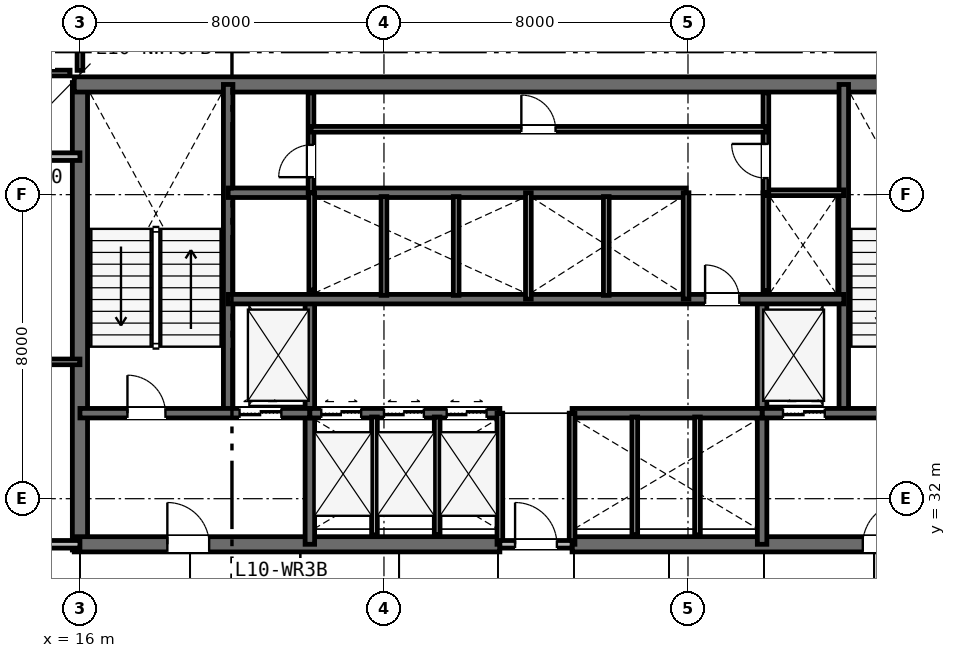
"""IFC4 building model, lengths in metres.
Left out: names, types, materials, properties, quantities, classifications, styles, units other than length and angle.
Written with IfcOpenShell. Run it as: python <this file> out.ifc"""

import sys

from ifc_helpers import new_model, si_unit, direction, frame, frame_2d, origin, place, context, subcontext, project, spatial, rectangle, extrude, element, fill, save


model = new_model("IFC4")
c1 = context("Model", 3, precision=1e-05, world=origin(), true_north=direction((0.0, 1.0)))
c2 = subcontext(c1, "Body", "Model", "MODEL_VIEW")
j1 = project(units=[si_unit("LENGTHUNIT", "METRE"), si_unit("PLANEANGLEUNIT", "RADIAN")], contexts=[c1])
p1 = place(None, origin())
s1 = spatial("IfcSite", under=j1, at=p1, CompositionType="ELEMENT")
p2 = place(p1, origin())
s2 = spatial("IfcBuilding", under=s1, at=p2, CompositionType="ELEMENT")
p3 = place(p2, frame((0.0, 0.0, 43.8)))
s3 = spatial("IfcBuildingStorey", under=s2, at=p3, CompositionType="ELEMENT", Elevation=43.8)
p4 = place(p3, frame((16.0, 30.65, 0.0), z_axis=(0.0, 0.0, 1.0), x_axis=(0.0, 1.0, 0.0)))
e1 = element("IfcWall", 1, at=p4, inside=s3, PredefinedType="SHEAR", context=c2, shape_type="SweptSolid", body=[
    extrude(rectangle(XDim=12.3, YDim=0.4, at=frame_2d((6.15, 0.0))), origin(), (0.0, 0.0, 1.0), 3.6),
])
p5 = place(p3, frame((15.85, 42.9, 0.0), z_axis=(0.0, 0.0, 1.0), x_axis=(1.0, 0.0, 0.0)))
e2 = element("IfcWall", 2, at=p5, inside=s3, PredefinedType="SHEAR", context=c2, shape_type="SweptSolid", body=[
    extrude(rectangle(XDim=24.3, YDim=0.4, at=frame_2d((12.15, 0.0))), origin(), (0.0, 0.0, 1.0), 3.6),
])
p6 = place(p3, frame((15.85, 30.8, 0.0), z_axis=(0.0, 0.0, 1.0), x_axis=(1.0, 0.0, 0.0)))
e3 = element("IfcWall", 3, at=p6, inside=s3, PredefinedType="SHEAR", context=c2, shape_type="SweptSolid", body=[
    extrude(rectangle(XDim=11.2, YDim=0.4, at=frame_2d((5.6, 0.0))), origin(), (0.0, 0.0, 1.0), 3.6),
])
p7 = place(p6, frame((2.45, 0.0, 0.0)))
e4 = element("IfcOpeningElement", 4, at=p7, cuts=e3, PredefinedType="OPENING", context=c2, shape_type="SweptSolid", body=[
    extrude(rectangle(XDim=1.1, YDim=2.15, at=frame_2d((0.55, 1.075))), frame((0.0, 0.21, 0.0), z_axis=(0.0, -1.0, 0.0), x_axis=(1.0, 0.0, 0.0)), (0.0, 0.0, 1.0), 0.42),
])
p8 = place(p3, frame((28.95, 30.8, 0.0), z_axis=(0.0, 0.0, 1.0), x_axis=(1.0, 0.0, 0.0)))
e5 = element("IfcWall", 5, at=p8, inside=s3, PredefinedType="SHEAR", context=c2, shape_type="SweptSolid", body=[
    extrude(rectangle(XDim=11.2, YDim=0.4, at=frame_2d((5.6, 0.0))), origin(), (0.0, 0.0, 1.0), 3.6),
])
p9 = place(p8, frame((7.65, 0.0, 0.0)))
e6 = element("IfcOpeningElement", 6, at=p9, cuts=e5, PredefinedType="OPENING", context=c2, shape_type="SweptSolid", body=[
    extrude(rectangle(XDim=1.1, YDim=2.15, at=frame_2d((0.55, 1.075))), frame((0.0, 0.21, 0.0), z_axis=(0.0, -1.0, 0.0), x_axis=(1.0, 0.0, 0.0)), (0.0, 0.0, 1.0), 0.42),
])
for number, where, z_axis, x_axis in (
    (7, (19.9, 34.25, 0.0), (0.0, 0.0, 1.0), (0.0, 1.0, 0.0)),
    (8, (36.1, 34.25, 0.0), (0.0, 0.0, 1.0), (0.0, 1.0, 0.0)),
):
    element("IfcWall", number, at=place(p3, frame(where, z_axis=z_axis, x_axis=x_axis)), inside=s3, PredefinedType="SHEAR", context=c2, shape_type="SweptSolid", body=[
        extrude(rectangle(XDim=8.65, YDim=0.25, at=frame_2d((4.325, 0.0))), origin(), (0.0, 0.0, 1.0), 3.6),
    ])
for number, where, z_axis, x_axis in (
    (9, (22.05, 30.8, 0.0), (0.0, 0.0, 1.0), (0.0, 1.0, 0.0)),
    (10, (33.95, 30.8, 0.0), (0.0, 0.0, 1.0), (0.0, 1.0, 0.0)),
):
    element("IfcWall", number, at=place(p3, frame(where, z_axis=z_axis, x_axis=x_axis)), inside=s3, PredefinedType="SHEAR", context=c2, shape_type="SweptSolid", body=[
        extrude(rectangle(XDim=6.45, YDim=0.25, at=frame_2d((3.225, 0.0))), origin(), (0.0, 0.0, 1.0), 3.6),
    ])
p10 = place(p3, frame((16.0, 34.25, 0.0), z_axis=(0.0, 0.0, 1.0), x_axis=(1.0, 0.0, 0.0)))
e11 = element("IfcWall", 11, at=p10, inside=s3, PredefinedType="SHEAR", context=c2, shape_type="SweptSolid", body=[
    extrude(rectangle(XDim=6.05, YDim=0.25, at=frame_2d((3.025, 0.0))), origin(), (0.0, 0.0, 1.0), 3.6),
])
p11 = place(p10, frame((1.25, 0.0, 0.0)))
e12 = element("IfcOpeningElement", 12, at=p11, cuts=e11, PredefinedType="OPENING", context=c2, shape_type="SweptSolid", body=[
    extrude(rectangle(XDim=1.0, YDim=2.15, at=frame_2d((0.5, 1.075))), frame((0.0, 0.135, 0.0), z_axis=(0.0, -1.0, 0.0), x_axis=(1.0, 0.0, 0.0)), (0.0, 0.0, 1.0), 0.27),
])
p12 = place(p10, frame((4.2, 0.0, 0.0)))
e13 = element("IfcOpeningElement", 13, at=p12, cuts=e11, PredefinedType="OPENING", context=c2, shape_type="SweptSolid", body=[
    extrude(rectangle(XDim=1.1, YDim=2.15, at=frame_2d((0.55, 1.075))), frame((0.0, 0.135, 0.0), z_axis=(0.0, -1.0, 0.0), x_axis=(1.0, 0.0, 0.0)), (0.0, 0.0, 1.0), 0.27),
])
p13 = place(p3, frame((33.95, 34.25, 0.0), z_axis=(0.0, 0.0, 1.0), x_axis=(1.0, 0.0, 0.0)))
e14 = element("IfcWall", 14, at=p13, inside=s3, PredefinedType="SHEAR", context=c2, shape_type="SweptSolid", body=[
    extrude(rectangle(XDim=6.05, YDim=0.25, at=frame_2d((3.025, 0.0))), origin(), (0.0, 0.0, 1.0), 3.6),
])
p14 = place(p13, frame((3.7, 0.0, 0.0)))
e15 = element("IfcOpeningElement", 15, at=p14, cuts=e14, PredefinedType="OPENING", context=c2, shape_type="SweptSolid", body=[
    extrude(rectangle(XDim=1.0, YDim=2.15, at=frame_2d((0.5, 1.075))), frame((0.0, 0.135, 0.0), z_axis=(0.0, -1.0, 0.0), x_axis=(1.0, 0.0, 0.0)), (0.0, 0.0, 1.0), 0.27),
])
p15 = place(p13, frame((0.55, 0.0, 0.0)))
e16 = element("IfcOpeningElement", 16, at=p15, cuts=e14, PredefinedType="OPENING", context=c2, shape_type="SweptSolid", body=[
    extrude(rectangle(XDim=1.1, YDim=2.15, at=frame_2d((0.55, 1.075))), frame((0.0, 0.135, 0.0), z_axis=(0.0, -1.0, 0.0), x_axis=(1.0, 0.0, 0.0)), (0.0, 0.0, 1.0), 0.27),
])
p16 = place(p3, frame((22.05, 34.25, 0.0), z_axis=(0.0, 0.0, 1.0), x_axis=(1.0, 0.0, 0.0)))
e17 = element("IfcWall", 17, at=p16, inside=s3, PredefinedType="SHEAR", context=c2, shape_type="SweptSolid", body=[
    extrude(rectangle(XDim=5.0, YDim=0.25, at=frame_2d((2.5, 0.0))), origin(), (0.0, 0.0, 1.0), 3.6),
])
p17 = place(p16, frame((0.3, 0.0, 0.0)))
e18 = element("IfcOpeningElement", 18, at=p17, cuts=e17, PredefinedType="OPENING", context=c2, shape_type="SweptSolid", body=[
    extrude(rectangle(XDim=1.05, YDim=2.15, at=frame_2d((0.525, 1.075))), frame((0.0, 0.135, 0.0), z_axis=(0.0, -1.0, 0.0), x_axis=(1.0, 0.0, 0.0)), (0.0, 0.0, 1.0), 0.27),
])
p18 = place(p16, frame((1.95, 0.0, 0.0)))
e19 = element("IfcOpeningElement", 19, at=p18, cuts=e17, PredefinedType="OPENING", context=c2, shape_type="SweptSolid", body=[
    extrude(rectangle(XDim=1.05, YDim=2.15, at=frame_2d((0.525, 1.075))), frame((0.0, 0.135, 0.0), z_axis=(0.0, -1.0, 0.0), x_axis=(1.0, 0.0, 0.0)), (0.0, 0.0, 1.0), 0.27),
])
p19 = place(p16, frame((3.6, 0.0, 0.0)))
e20 = element("IfcOpeningElement", 20, at=p19, cuts=e17, PredefinedType="OPENING", context=c2, shape_type="SweptSolid", body=[
    extrude(rectangle(XDim=1.05, YDim=2.15, at=frame_2d((0.525, 1.075))), frame((0.0, 0.135, 0.0), z_axis=(0.0, -1.0, 0.0), x_axis=(1.0, 0.0, 0.0)), (0.0, 0.0, 1.0), 0.27),
])
p20 = place(p3, frame((28.95, 34.25, 0.0), z_axis=(0.0, 0.0, 1.0), x_axis=(1.0, 0.0, 0.0)))
e21 = element("IfcWall", 21, at=p20, inside=s3, PredefinedType="SHEAR", context=c2, shape_type="SweptSolid", body=[
    extrude(rectangle(XDim=5.0, YDim=0.25, at=frame_2d((2.5, 0.0))), origin(), (0.0, 0.0, 1.0), 3.6),
])
p21 = place(p3, frame((19.9, 37.25, 0.0), z_axis=(0.0, 0.0, 1.0), x_axis=(1.0, 0.0, 0.0)))
e22 = element("IfcWall", 22, at=p21, inside=s3, PredefinedType="SHEAR", context=c2, shape_type="SweptSolid", body=[
    extrude(rectangle(XDim=16.2, YDim=0.25, at=frame_2d((8.1, 0.0))), origin(), (0.0, 0.0, 1.0), 3.6),
])
p22 = place(p21, frame((12.55, 0.0, 0.0)))
e23 = element("IfcOpeningElement", 23, at=p22, cuts=e22, PredefinedType="OPENING", context=c2, shape_type="SweptSolid", body=[
    extrude(rectangle(XDim=0.9, YDim=2.15, at=frame_2d((0.45, 1.075))), frame((0.0, 0.135, 0.0), z_axis=(0.0, -1.0, 0.0), x_axis=(1.0, 0.0, 0.0)), (0.0, 0.0, 1.0), 0.27),
])
p23 = place(p3, frame((19.9, 40.05, 0.0), z_axis=(0.0, 0.0, 1.0), x_axis=(1.0, 0.0, 0.0)))
e24 = element("IfcWall", 24, at=p23, inside=s3, PredefinedType="SHEAR", context=c2, shape_type="SweptSolid", body=[
    extrude(rectangle(XDim=12.05, YDim=0.25, at=frame_2d((6.025, 0.0))), origin(), (0.0, 0.0, 1.0), 3.6),
])
for number, where, z_axis, x_axis in (
    (25, (27.05, 30.8, 0.0), (0.0, 0.0, 1.0), (0.0, 1.0, 0.0)),
    (26, (28.95, 30.8, 0.0), (0.0, 0.0, 1.0), (0.0, 1.0, 0.0)),
):
    element("IfcWall", number, at=place(p3, frame(where, z_axis=z_axis, x_axis=x_axis)), inside=s3, PredefinedType="PLUMBINGWALL", context=c2, shape_type="SweptSolid", body=[
        extrude(rectangle(XDim=3.45, YDim=0.15, at=frame_2d((1.725, 0.0))), origin(), (0.0, 0.0, 1.0), 3.33),
    ])
p24 = place(p3, frame((27.05, 30.8, 0.0), z_axis=(0.0, 0.0, 1.0), x_axis=(1.0, 0.0, 0.0)))
e27 = element("IfcWall", 27, at=p24, inside=s3, PredefinedType="PARTITIONING", context=c2, shape_type="SweptSolid", body=[
    extrude(rectangle(XDim=1.9, YDim=0.2, at=frame_2d((0.95, 0.0))), origin(), (0.0, 0.0, 1.0), 3.33),
])
p25 = place(p24, frame((0.4, 0.0, 0.0)))
e28 = element("IfcOpeningElement", 28, at=p25, cuts=e27, PredefinedType="OPENING", context=c2, shape_type="SweptSolid", body=[
    extrude(rectangle(XDim=1.1, YDim=2.15, at=frame_2d((0.55, 1.075))), frame((0.0, 0.11, 0.0), z_axis=(0.0, -1.0, 0.0), x_axis=(1.0, 0.0, 0.0)), (0.0, 0.0, 1.0), 0.22),
])
for number, where, z_axis, x_axis in (
    (29, (23.75, 31.05, 0.0), (0.0, 0.0, 1.0), (0.0, 1.0, 0.0)),
    (30, (25.4, 31.05, 0.0), (0.0, 0.0, 1.0), (0.0, 1.0, 0.0)),
    (31, (30.6, 31.05, 0.0), (0.0, 0.0, 1.0), (0.0, 1.0, 0.0)),
    (32, (32.25, 31.05, 0.0), (0.0, 0.0, 1.0), (0.0, 1.0, 0.0)),
):
    element("IfcWall", number, at=place(p3, frame(where, z_axis=z_axis, x_axis=x_axis)), inside=s3, PredefinedType="PLUMBINGWALL", context=c2, shape_type="SweptSolid", body=[
        extrude(rectangle(XDim=3.1, YDim=0.15, at=frame_2d((1.55, 0.0))), origin(), (0.0, 0.0, 1.0), 3.33),
    ])
p26 = place(p3, frame((22.1, 37.49, 0.0), z_axis=(0.0, 0.0, 1.0), x_axis=(0.0, 1.0, 0.0)))
e33 = element("IfcWall", 33, at=p26, inside=s3, PredefinedType="PLUMBINGWALL", context=c2, shape_type="SweptSolid", body=[
    extrude(rectangle(XDim=2.56, YDim=0.15, at=frame_2d((1.28, 0.0))), origin(), (0.0, 0.0, 1.0), 3.33),
])
p27 = place(p3, frame((27.8, 37.25, 0.0), z_axis=(0.0, 0.0, 1.0), x_axis=(0.0, 1.0, 0.0)))
e34 = element("IfcWall", 34, at=p27, inside=s3, PredefinedType="PLUMBINGWALL", context=c2, shape_type="SweptSolid", body=[
    extrude(rectangle(XDim=2.8, YDim=0.15, at=frame_2d((1.4, 0.0))), origin(), (0.0, 0.0, 1.0), 3.33),
])
for number, where, z_axis, x_axis in (
    (35, (24.0, 37.35, 0.0), (0.0, 0.0, 1.0), (0.0, 1.0, 0.0)),
    (36, (25.9, 37.35, 0.0), (0.0, 0.0, 1.0), (0.0, 1.0, 0.0)),
):
    element("IfcWall", number, at=place(p3, frame(where, z_axis=z_axis, x_axis=x_axis)), inside=s3, PredefinedType="PLUMBINGWALL", context=c2, shape_type="SweptSolid", body=[
        extrude(rectangle(XDim=2.6, YDim=0.15, at=frame_2d((1.3, 0.0))), origin(), (0.0, 0.0, 1.0), 3.33),
    ])
p28 = place(p3, frame((31.95, 37.25, 0.0), z_axis=(0.0, 0.0, 1.0), x_axis=(0.0, 1.0, 0.0)))
e37 = element("IfcWall", 37, at=p28, inside=s3, PredefinedType="PLUMBINGWALL", context=c2, shape_type="SweptSolid", body=[
    extrude(rectangle(XDim=2.8, YDim=0.15, at=frame_2d((1.4, 0.0))), origin(), (0.0, 0.0, 1.0), 3.33),
])
p29 = place(p3, frame((29.85, 37.35, 0.0), z_axis=(0.0, 0.0, 1.0), x_axis=(0.0, 1.0, 0.0)))
e38 = element("IfcWall", 38, at=p29, inside=s3, PredefinedType="PLUMBINGWALL", context=c2, shape_type="SweptSolid", body=[
    extrude(rectangle(XDim=2.6, YDim=0.15, at=frame_2d((1.3, 0.0))), origin(), (0.0, 0.0, 1.0), 3.33),
])
p30 = place(p3, frame((34.05, 37.473, 0.0), z_axis=(0.0, 0.0, 1.0), x_axis=(0.0, 1.0, 0.0)))
e39 = element("IfcWall", 39, at=p30, inside=s3, PredefinedType="PLUMBINGWALL", context=c2, shape_type="SweptSolid", body=[
    extrude(rectangle(XDim=2.577, YDim=0.15, at=frame_2d((1.288, 0.0))), origin(), (0.0, 0.0, 1.0), 3.33),
])
p31 = place(p3, frame((34.05, 40.05, 0.0), z_axis=(0.0, 0.0, 1.0), x_axis=(1.0, 0.0, 0.0)))
e40 = element("IfcWall", 40, at=p31, inside=s3, PredefinedType="PARTITIONING", context=c2, shape_type="SweptSolid", body=[
    extrude(rectangle(XDim=2.05, YDim=0.15, at=frame_2d((1.025, 0.0))), origin(), (0.0, 0.0, 1.0), 3.33),
])
p32 = place(p3, frame((34.05, 40.05, 0.0), z_axis=(0.0, 0.0, 1.0), x_axis=(0.0, 1.0, 0.0)))
e41 = element("IfcWall", 41, at=p32, inside=s3, PredefinedType="PARTITIONING", context=c2, shape_type="SweptSolid", body=[
    extrude(rectangle(XDim=2.63, YDim=0.15, at=frame_2d((1.315, 0.0))), origin(), (0.0, 0.0, 1.0), 3.33),
])
p33 = place(p32, frame((0.385, 0.0, 0.0)))
e42 = element("IfcOpeningElement", 42, at=p33, cuts=e41, PredefinedType="OPENING", context=c2, shape_type="SweptSolid", body=[
    extrude(rectangle(XDim=0.9, YDim=2.15, at=frame_2d((0.45, 1.075))), frame((0.0, 0.085, 0.0), z_axis=(0.0, -1.0, 0.0), x_axis=(1.0, 0.0, 0.0)), (0.0, 0.0, 1.0), 0.17),
])
p34 = place(p3, frame((22.08, 40.05, 0.0), z_axis=(0.0, 0.0, 1.0), x_axis=(0.0, 1.0, 0.0)))
e43 = element("IfcWall", 43, at=p34, inside=s3, PredefinedType="PARTITIONING", context=c2, shape_type="SweptSolid", body=[
    extrude(rectangle(XDim=2.63, YDim=0.15, at=frame_2d((1.315, 0.0))), origin(), (0.0, 0.0, 1.0), 3.33),
])
p35 = place(p34, frame((0.41, 0.0, 0.0)))
e44 = element("IfcOpeningElement", 44, at=p35, cuts=e43, PredefinedType="OPENING", context=c2, shape_type="SweptSolid", body=[
    extrude(rectangle(XDim=0.85, YDim=2.15, at=frame_2d((0.425, 1.075))), frame((0.0, 0.085, 0.0), z_axis=(0.0, -1.0, 0.0), x_axis=(1.0, 0.0, 0.0)), (0.0, 0.0, 1.0), 0.17),
])
p36 = place(p3, frame((22.08, 41.72, 0.0), z_axis=(0.0, 0.0, 1.0), x_axis=(1.0, 0.0, 0.0)))
e45 = element("IfcWall", 45, at=p36, inside=s3, PredefinedType="PARTITIONING", context=c2, shape_type="SweptSolid", body=[
    extrude(rectangle(XDim=11.97, YDim=0.15, at=frame_2d((5.985, 0.0))), origin(), (0.0, 0.0, 1.0), 3.33),
])
p37 = place(p36, frame((5.535, 0.0, 0.0)))
e46 = element("IfcOpeningElement", 46, at=p37, cuts=e45, PredefinedType="OPENING", context=c2, shape_type="SweptSolid", body=[
    extrude(rectangle(XDim=0.9, YDim=2.15, at=frame_2d((0.45, 1.075))), frame((0.0, 0.085, 0.0), z_axis=(0.0, -1.0, 0.0), x_axis=(1.0, 0.0, 0.0)), (0.0, 0.0, 1.0), 0.17),
])
p38 = place(p3, frame((8.3, 35.6, 0.0), z_axis=(0.0, 0.0, 1.0), x_axis=(1.0, 0.0, 0.0)))
e47 = element("IfcWall", 47, at=p38, inside=s3, PredefinedType="PARTITIONING", context=c2, shape_type="SweptSolid", body=[
    extrude(rectangle(XDim=7.7, YDim=0.15, at=frame_2d((3.85, 0.0))), origin(), (0.0, 0.0, 1.0), 2.82),
])
p39 = place(p3, frame((8.3, 30.8, 0.0), z_axis=(0.0, 0.0, 1.0), x_axis=(1.0, 0.0, 0.0)))
e48 = element("IfcWall", 48, at=p39, inside=s3, PredefinedType="PARTITIONING", context=c2, shape_type="SweptSolid", body=[
    extrude(rectangle(XDim=7.7, YDim=0.2, at=frame_2d((3.85, 0.0))), origin(), (0.0, 0.0, 1.0), 2.82),
])
p40 = place(p39, frame((5.325, 0.0, 0.0)))
e49 = element("IfcOpeningElement", 49, at=p40, cuts=e48, PredefinedType="OPENING", context=c2, shape_type="SweptSolid", body=[
    extrude(rectangle(XDim=0.95, YDim=2.15, at=frame_2d((0.475, 1.075))), frame((0.0, 0.11, 0.0), z_axis=(0.0, -1.0, 0.0), x_axis=(1.0, 0.0, 0.0)), (0.0, 0.0, 1.0), 0.22),
])
p41 = place(p3, frame((0.1, 41.0, 0.0), z_axis=(0.0, 0.0, 1.0), x_axis=(1.0, 0.0, 0.0)))
e50 = element("IfcWall", 50, at=p41, inside=s3, PredefinedType="PARTITIONING", context=c2, shape_type="SweptSolid", body=[
    extrude(rectangle(XDim=15.9, YDim=0.2, at=frame_2d((7.95, 0.0))), origin(), (0.0, 0.0, 1.0), 2.82),
])
p42 = place(p41, frame((6.779, 0.0, 0.0)))
e51 = element("IfcOpeningElement", 51, at=p42, cuts=e50, PredefinedType="OPENING", context=c2, shape_type="SweptSolid", body=[
    extrude(rectangle(XDim=0.95, YDim=2.15, at=frame_2d((0.475, 1.075))), frame((0.0, 0.11, 0.0), z_axis=(0.0, -1.0, 0.0), x_axis=(1.0, 0.0, 0.0)), (0.0, 0.0, 1.0), 0.22),
])
p43 = place(p3, frame((13.55, 43.2, 0.0), z_axis=(0.0, 0.0, 1.0), x_axis=(1.0, 0.0, 0.0)))
e52 = element("IfcWall", 52, at=p43, inside=s3, PredefinedType="PARTITIONING", context=c2, shape_type="SweptSolid", body=[
    extrude(rectangle(XDim=2.19, YDim=0.15, at=frame_2d((1.095, 0.0))), origin(), (0.0, 0.0, 1.0), 3.33),
])
p44 = place(p3, frame((16.0, 43.27, 0.0), z_axis=(0.0, 0.0, 1.0), x_axis=(0.0, 1.0, 0.0)))
e53 = element("IfcWall", 53, at=p44, inside=s3, PredefinedType="PARTITIONING", context=c2, shape_type="SweptSolid", body=[
    extrude(rectangle(XDim=4.63, YDim=0.15, at=frame_2d((2.315, 0.0))), origin(), (0.0, 0.0, 1.0), 2.93),
])
p45 = place(p25, origin())
e54 = element("IfcDoor", 54, at=p45, inside=s3, OperationType="SINGLE_SWING_LEFT", PredefinedType="DOOR", context=c2, shape_type="SweptSolid", body=[
    extrude(rectangle(XDim=1.1, YDim=2.15, at=frame_2d((0.55, 1.075))), frame((0.0, 0.025, 0.0), z_axis=(0.0, -1.0, 0.0), x_axis=(1.0, 0.0, 0.0)), (0.0, 0.0, 1.0), 0.05),
])
fill(e28, e54)
p46 = place(p11, origin())
e55 = element("IfcDoor", 55, at=p46, inside=s3, OperationType="SINGLE_SWING_LEFT", PredefinedType="DOOR", context=c2, shape_type="SweptSolid", body=[
    extrude(rectangle(XDim=1.0, YDim=2.15, at=frame_2d((0.5, 1.075))), frame((0.0, 0.025, 0.0), z_axis=(0.0, -1.0, 0.0), x_axis=(1.0, 0.0, 0.0)), (0.0, 0.0, 1.0), 0.05),
])
fill(e12, e55)
p47 = place(p7, origin())
e56 = element("IfcDoor", 56, at=p47, inside=s3, OperationType="SINGLE_SWING_LEFT", PredefinedType="DOOR", context=c2, shape_type="SweptSolid", body=[
    extrude(rectangle(XDim=1.1, YDim=2.15, at=frame_2d((0.55, 1.075))), frame((0.0, 0.025, 0.0), z_axis=(0.0, -1.0, 0.0), x_axis=(1.0, 0.0, 0.0)), (0.0, 0.0, 1.0), 0.05),
])
fill(e4, e56)
p48 = place(p9, origin())
e57 = element("IfcDoor", 57, at=p48, inside=s3, OperationType="SINGLE_SWING_RIGHT", PredefinedType="DOOR", context=c2, shape_type="SweptSolid", body=[
    extrude(rectangle(XDim=1.1, YDim=2.15, at=frame_2d((0.55, 1.075))), frame((0.0, 0.025, 0.0), z_axis=(0.0, -1.0, 0.0), x_axis=(1.0, 0.0, 0.0)), (0.0, 0.0, 1.0), 0.05),
])
fill(e6, e57)
p49 = place(p22, origin())
e58 = element("IfcDoor", 58, at=p49, inside=s3, OperationType="SINGLE_SWING_LEFT", PredefinedType="DOOR", context=c2, shape_type="SweptSolid", body=[
    extrude(rectangle(XDim=0.9, YDim=2.15, at=frame_2d((0.45, 1.075))), frame((0.0, 0.025, 0.0), z_axis=(0.0, -1.0, 0.0), x_axis=(1.0, 0.0, 0.0)), (0.0, 0.0, 1.0), 0.05),
])
fill(e23, e58)
p50 = place(p33, origin())
e59 = element("IfcDoor", 59, at=p50, inside=s3, OperationType="SINGLE_SWING_RIGHT", PredefinedType="DOOR", context=c2, shape_type="SweptSolid", body=[
    extrude(rectangle(XDim=0.9, YDim=2.15, at=frame_2d((0.45, 1.075))), frame((0.0, 0.025, 0.0), z_axis=(0.0, -1.0, 0.0), x_axis=(1.0, 0.0, 0.0)), (0.0, 0.0, 1.0), 0.05),
])
fill(e42, e59)
p51 = place(p35, origin())
e60 = element("IfcDoor", 60, at=p51, inside=s3, OperationType="SINGLE_SWING_LEFT", PredefinedType="DOOR", context=c2, shape_type="SweptSolid", body=[
    extrude(rectangle(XDim=0.85, YDim=2.15, at=frame_2d((0.425, 1.075))), frame((0.0, 0.025, 0.0), z_axis=(0.0, -1.0, 0.0), x_axis=(1.0, 0.0, 0.0)), (0.0, 0.0, 1.0), 0.05),
])
fill(e44, e60)
p52 = place(p37, origin())
e61 = element("IfcDoor", 61, at=p52, inside=s3, OperationType="SINGLE_SWING_LEFT", PredefinedType="DOOR", context=c2, shape_type="SweptSolid", body=[
    extrude(rectangle(XDim=0.9, YDim=2.15, at=frame_2d((0.45, 1.075))), frame((0.0, 0.025, 0.0), z_axis=(0.0, -1.0, 0.0), x_axis=(1.0, 0.0, 0.0)), (0.0, 0.0, 1.0), 0.05),
])
fill(e46, e61)
p53 = place(p12, origin())
e62 = element("IfcDoor", 62, at=p53, inside=s3, OperationType="DOUBLE_DOOR_SLIDING", PredefinedType="DOOR", context=c2, shape_type="SweptSolid", body=[
    extrude(rectangle(XDim=1.1, YDim=2.15, at=frame_2d((0.55, 1.075))), frame((0.0, 0.025, 0.0), z_axis=(0.0, -1.0, 0.0), x_axis=(1.0, 0.0, 0.0)), (0.0, 0.0, 1.0), 0.05),
])
fill(e13, e62)
p54 = place(p15, origin())
e63 = element("IfcDoor", 63, at=p54, inside=s3, OperationType="DOUBLE_DOOR_SLIDING", PredefinedType="DOOR", context=c2, shape_type="SweptSolid", body=[
    extrude(rectangle(XDim=1.1, YDim=2.15, at=frame_2d((0.55, 1.075))), frame((0.0, 0.025, 0.0), z_axis=(0.0, -1.0, 0.0), x_axis=(1.0, 0.0, 0.0)), (0.0, 0.0, 1.0), 0.05),
])
fill(e16, e63)
p55 = place(p17, origin())
e64 = element("IfcDoor", 64, at=p55, inside=s3, OperationType="DOUBLE_DOOR_SLIDING", PredefinedType="DOOR", context=c2, shape_type="SweptSolid", body=[
    extrude(rectangle(XDim=1.05, YDim=2.15, at=frame_2d((0.525, 1.075))), frame((0.0, 0.025, 0.0), z_axis=(0.0, -1.0, 0.0), x_axis=(1.0, 0.0, 0.0)), (0.0, 0.0, 1.0), 0.05),
])
fill(e18, e64)
p56 = place(p18, origin())
e65 = element("IfcDoor", 65, at=p56, inside=s3, OperationType="DOUBLE_DOOR_SLIDING", PredefinedType="DOOR", context=c2, shape_type="SweptSolid", body=[
    extrude(rectangle(XDim=1.05, YDim=2.15, at=frame_2d((0.525, 1.075))), frame((0.0, 0.025, 0.0), z_axis=(0.0, -1.0, 0.0), x_axis=(1.0, 0.0, 0.0)), (0.0, 0.0, 1.0), 0.05),
])
fill(e19, e65)
p57 = place(p19, origin())
e66 = element("IfcDoor", 66, at=p57, inside=s3, OperationType="DOUBLE_DOOR_SLIDING", PredefinedType="DOOR", context=c2, shape_type="SweptSolid", body=[
    extrude(rectangle(XDim=1.05, YDim=2.15, at=frame_2d((0.525, 1.075))), frame((0.0, 0.025, 0.0), z_axis=(0.0, -1.0, 0.0), x_axis=(1.0, 0.0, 0.0)), (0.0, 0.0, 1.0), 0.05),
])
fill(e20, e66)
save(model, sys.argv[1])
